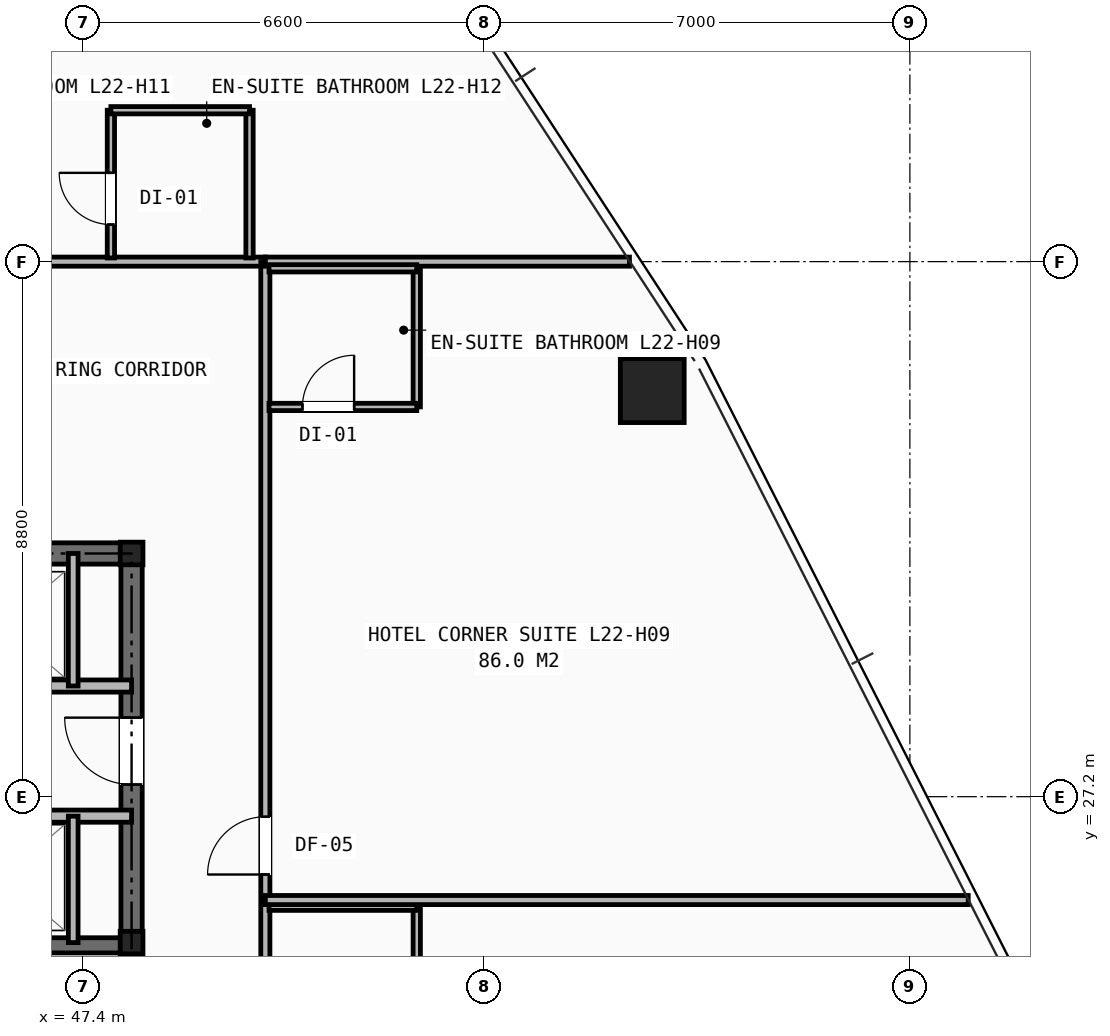
"""IFC4 building model, lengths in metres.
Left out: names, types, materials, properties, quantities, classifications, styles, units other than length and angle.
Written with IfcOpenShell. Run it as: python <this file> out.ifc"""

import sys

from ifc_helpers import new_model, si_unit, direction, frame, frame_2d, origin, origin_2d, place, context, subcontext, project, spatial, rectangle, hollow_rectangle, i_section, extrude, element, fill, save


model = new_model("IFC4")
c1 = context("Model", 3, precision=1e-05, world=origin(), true_north=direction((0.0, 1.0)))
c2 = subcontext(c1, "Body", "Model", "MODEL_VIEW")
j1 = project(units=[si_unit("LENGTHUNIT", "METRE"), si_unit("PLANEANGLEUNIT", "RADIAN")], contexts=[c1])
p1 = place(None, origin())
s1 = spatial("IfcSite", under=j1, at=p1, CompositionType="ELEMENT")
p2 = place(p1, origin())
s2 = spatial("IfcBuilding", under=s1, at=p2, CompositionType="ELEMENT")
p3 = place(p2, frame((0.0, 0.0, 79.8)))
s3 = spatial("IfcBuildingStorey", under=s2, at=p3, CompositionType="ELEMENT", Elevation=79.8)
for number, where, z_axis, x_axis in (
    (1, (48.2, 24.8, 0.0), (0.0, 0.0, 1.0), (1.0, 0.0, 0.0)),
    (2, (48.2, 31.2, 0.0), (0.0, 0.0, 1.0), (1.0, 0.0, 0.0)),
):
    element("IfcColumn", number, at=place(p3, frame(where, z_axis=z_axis, x_axis=x_axis)), inside=s3, PredefinedType="COLUMN", context=c2, shape_type="SweptSolid", body=[
        extrude(i_section(OverallWidth=0.374, OverallDepth=0.372, WebThickness=0.016, FlangeThickness=0.026, at=origin_2d()), origin(), (0.0, 0.0, 1.0), 3.2),
    ])
p4 = place(p3, frame((56.763, 33.878, 0.0), z_axis=(0.0, 0.0, 1.0), x_axis=(1.0, 0.0, 0.0)))
e3 = element("IfcColumn", 3, at=p4, inside=s3, PredefinedType="COLUMN", context=c2, shape_type="SweptSolid", body=[
    extrude(hollow_rectangle(XDim=1.05, YDim=1.05, WallThickness=0.07, at=origin_2d()), origin(), (0.0, 0.0, 1.0), 3.2),
])
p5 = place(p3, frame((31.8, 31.2, 0.0), z_axis=(0.0, 0.0, 1.0), x_axis=(1.0, 0.0, 0.0)))
e4 = element("IfcWall", 4, at=p5, inside=s3, PredefinedType="SHEAR", context=c2, shape_type="SweptSolid", body=[
    extrude(rectangle(XDim=16.4, YDim=0.35, at=frame_2d((8.2, 0.0))), origin(), (0.0, 0.0, 1.0), 2.97),
])
p6 = place(p3, frame((48.2, 16.4, 0.0), z_axis=(0.0, 0.0, 1.0), x_axis=(0.0, 1.0, 0.0)))
e5 = element("IfcWall", 5, at=p6, inside=s3, PredefinedType="SHEAR", context=c2, shape_type="SweptSolid", body=[
    extrude(rectangle(XDim=14.8, YDim=0.35, at=frame_2d((7.4, 0.0))), origin(), (0.0, 0.0, 1.0), 2.97),
])
p7 = place(p6, frame((11.0, 0.0, 0.0)))
e6 = element("IfcOpeningElement", 6, at=p7, cuts=e5, PredefinedType="OPENING", context=c2, shape_type="SweptSolid", body=[
    extrude(rectangle(XDim=1.1, YDim=2.15, at=frame_2d((0.55, 1.075))), frame((0.0, 0.185, 0.0), z_axis=(0.0, -1.0, 0.0), x_axis=(1.0, 0.0, 0.0)), (0.0, 0.0, 1.0), 0.37),
])
p8 = place(p3, frame((44.955, 24.755, 0.0), z_axis=(0.0, 0.0, 1.0), x_axis=(1.0, 0.0, 0.0)))
e7 = element("IfcWall", 7, at=p8, inside=s3, PredefinedType="SHEAR", context=c2, shape_type="SweptSolid", body=[
    extrude(rectangle(XDim=3.245, YDim=0.25, at=frame_2d((1.623, 0.0))), origin(), (0.0, 0.0, 1.0), 2.97),
])
p9 = place(p3, frame((33.82, 29.02, 0.0), z_axis=(0.0, 0.0, 1.0), x_axis=(1.0, 0.0, 0.0)))
e8 = element("IfcWall", 8, at=p9, inside=s3, PredefinedType="SOLIDWALL", context=c2, shape_type="SweptSolid", body=[
    extrude(rectangle(XDim=14.38, YDim=0.2, at=frame_2d((7.19, 0.0))), origin(), (0.0, 0.0, 1.0), 2.421),
])
p10 = place(p9, frame((0.53, 0.0, 0.0)))
e9 = element("IfcOpeningElement", 9, at=p10, cuts=e8, PredefinedType="OPENING", context=c2, shape_type="SweptSolid", body=[
    extrude(rectangle(XDim=1.1, YDim=2.15, at=frame_2d((0.55, 1.075))), frame((0.0, 0.11, 0.0), z_axis=(0.0, -1.0, 0.0), x_axis=(1.0, 0.0, 0.0)), (0.0, 0.0, 1.0), 0.22),
])
p11 = place(p9, frame((2.69, 0.0, 0.0)))
e10 = element("IfcOpeningElement", 10, at=p11, cuts=e8, PredefinedType="OPENING", context=c2, shape_type="SweptSolid", body=[
    extrude(rectangle(XDim=1.1, YDim=2.15, at=frame_2d((0.55, 1.075))), frame((0.0, 0.11, 0.0), z_axis=(0.0, -1.0, 0.0), x_axis=(1.0, 0.0, 0.0)), (0.0, 0.0, 1.0), 0.22),
])
p12 = place(p9, frame((4.85, 0.0, 0.0)))
e11 = element("IfcOpeningElement", 11, at=p12, cuts=e8, PredefinedType="OPENING", context=c2, shape_type="SweptSolid", body=[
    extrude(rectangle(XDim=1.1, YDim=2.15, at=frame_2d((0.55, 1.075))), frame((0.0, 0.11, 0.0), z_axis=(0.0, -1.0, 0.0), x_axis=(1.0, 0.0, 0.0)), (0.0, 0.0, 1.0), 0.22),
])
p13 = place(p9, frame((7.01, 0.0, 0.0)))
e12 = element("IfcOpeningElement", 12, at=p13, cuts=e8, PredefinedType="OPENING", context=c2, shape_type="SweptSolid", body=[
    extrude(rectangle(XDim=1.1, YDim=2.15, at=frame_2d((0.55, 1.075))), frame((0.0, 0.11, 0.0), z_axis=(0.0, -1.0, 0.0), x_axis=(1.0, 0.0, 0.0)), (0.0, 0.0, 1.0), 0.22),
])
p14 = place(p3, frame((31.8, 26.88, 0.0), z_axis=(0.0, 0.0, 1.0), x_axis=(1.0, 0.0, 0.0)))
e13 = element("IfcWall", 13, at=p14, inside=s3, PredefinedType="SOLIDWALL", context=c2, shape_type="SweptSolid", body=[
    extrude(rectangle(XDim=16.4, YDim=0.2, at=frame_2d((8.2, 0.0))), origin(), (0.0, 0.0, 1.0), 2.421),
])
p15 = place(p14, frame((0.55, 0.0, 0.0)))
e14 = element("IfcOpeningElement", 14, at=p15, cuts=e13, PredefinedType="OPENING", context=c2, shape_type="SweptSolid", body=[
    extrude(rectangle(XDim=0.85, YDim=2.05, at=frame_2d((0.425, 1.025))), frame((0.0, 0.11, 0.0), z_axis=(0.0, -1.0, 0.0), x_axis=(1.0, 0.0, 0.0)), (0.0, 0.0, 1.0), 0.22),
])
p16 = place(p3, frame((47.24, 29.02, 0.0), z_axis=(0.0, 0.0, 1.0), x_axis=(0.0, 1.0, 0.0)))
e15 = element("IfcWall", 15, at=p16, inside=s3, PredefinedType="SOLIDWALL", context=c2, shape_type="SweptSolid", body=[
    extrude(rectangle(XDim=2.18, YDim=0.16, at=frame_2d((1.09, 0.0))), origin(), (0.0, 0.0, 1.0), 2.421),
])
p17 = place(p3, frame((47.24, 24.8, 0.0), z_axis=(0.0, 0.0, 1.0), x_axis=(0.0, 1.0, 0.0)))
e16 = element("IfcWall", 16, at=p17, inside=s3, PredefinedType="SOLIDWALL", context=c2, shape_type="SweptSolid", body=[
    extrude(rectangle(XDim=2.08, YDim=0.16, at=frame_2d((1.04, 0.0))), origin(), (0.0, 0.0, 1.0), 2.97),
])
p18 = place(p3, frame((40.75, 36.0, 0.0), z_axis=(0.0, 0.0, 1.0), x_axis=(1.0, 0.0, 0.0)))
e17 = element("IfcWall", 17, at=p18, inside=s3, PredefinedType="PARTITIONING", context=c2, shape_type="SweptSolid", body=[
    extrude(rectangle(XDim=9.65, YDim=0.15, at=frame_2d((4.825, 0.0))), origin(), (0.0, 0.0, 1.0), 2.503),
])
p19 = place(p18, frame((3.47, 0.0, 0.0)))
e18 = element("IfcOpeningElement", 18, at=p19, cuts=e17, PredefinedType="OPENING", context=c2, shape_type="SweptSolid", body=[
    extrude(rectangle(XDim=0.95, YDim=2.1, at=frame_2d((0.475, 1.05))), frame((0.0, 0.085, 0.0), z_axis=(0.0, -1.0, 0.0), x_axis=(1.0, 0.0, 0.0)), (0.0, 0.0, 1.0), 0.17),
])
p20 = place(p3, frame((50.4, 14.1, 0.0), z_axis=(0.0, 0.0, 1.0), x_axis=(0.0, 1.0, 0.0)))
e19 = element("IfcWall", 19, at=p20, inside=s3, PredefinedType="PARTITIONING", context=c2, shape_type="SweptSolid", body=[
    extrude(rectangle(XDim=21.9, YDim=0.15, at=frame_2d((10.95, 0.0))), origin(), (0.0, 0.0, 1.0), 2.181),
])
p21 = place(p20, frame((0.42, 0.0, 0.0)))
e20 = element("IfcOpeningElement", 20, at=p21, cuts=e19, PredefinedType="OPENING", context=c2, shape_type="SweptSolid", body=[
    extrude(rectangle(XDim=0.95, YDim=2.1, at=frame_2d((0.475, 1.05))), frame((0.0, 0.085, 0.0), z_axis=(0.0, -1.0, 0.0), x_axis=(1.0, 0.0, 0.0)), (0.0, 0.0, 1.0), 0.17),
])
p22 = place(p20, frame((11.82, 0.0, 0.0)))
e21 = element("IfcOpeningElement", 21, at=p22, cuts=e19, PredefinedType="OPENING", context=c2, shape_type="SweptSolid", body=[
    extrude(rectangle(XDim=0.95, YDim=2.1, at=frame_2d((0.475, 1.05))), frame((0.0, 0.085, 0.0), z_axis=(0.0, -1.0, 0.0), x_axis=(1.0, 0.0, 0.0)), (0.0, 0.0, 1.0), 0.17),
])
p23 = place(p3, frame((50.4, 36.0, 0.0), z_axis=(0.0, 0.0, 1.0), x_axis=(1.0, 0.0, 0.0)))
e22 = element("IfcWall", 22, at=p23, inside=s3, PredefinedType="PARTITIONING", context=c2, shape_type="SweptSolid", body=[
    extrude(rectangle(XDim=5.989, YDim=0.15, at=frame_2d((2.994, 0.0))), origin(), (0.0, 0.0, 1.0), 2.258),
])
p24 = place(p3, frame((52.89, 23.11, 0.0), z_axis=(0.0, 0.0, 1.0), x_axis=(0.0, 1.0, 0.0)))
e23 = element("IfcWall", 23, at=p24, inside=s3, PredefinedType="PARTITIONING", context=c2, shape_type="SweptSolid", body=[
    extrude(rectangle(XDim=2.28, YDim=0.12, at=frame_2d((1.14, 0.0))), origin(), (0.0, 0.0, 1.0), 2.97),
])
p25 = place(p3, frame((50.46, 25.39, 0.0), z_axis=(0.0, 0.0, 1.0), x_axis=(1.0, 0.0, 0.0)))
e24 = element("IfcWall", 24, at=p25, inside=s3, PredefinedType="PARTITIONING", context=c2, shape_type="SweptSolid", body=[
    extrude(rectangle(XDim=2.43, YDim=0.12, at=frame_2d((1.215, 0.0))), origin(), (0.0, 0.0, 1.0), 2.97),
])
p26 = place(p3, frame((50.4, 25.5, 0.0), z_axis=(0.0, 0.0, 1.0), x_axis=(1.0, 0.0, 0.0)))
e25 = element("IfcWall", 25, at=p26, inside=s3, PredefinedType="PARTITIONING", context=c2, shape_type="SweptSolid", body=[
    extrude(rectangle(XDim=11.56, YDim=0.15, at=frame_2d((5.78, 0.0))), origin(), (0.0, 0.0, 1.0), 2.258),
])
p27 = place(p3, frame((52.89, 33.61, 0.0), z_axis=(0.0, 0.0, 1.0), x_axis=(0.0, 1.0, 0.0)))
e26 = element("IfcWall", 26, at=p27, inside=s3, PredefinedType="PARTITIONING", context=c2, shape_type="SweptSolid", body=[
    extrude(rectangle(XDim=2.28, YDim=0.12, at=frame_2d((1.14, 0.0))), origin(), (0.0, 0.0, 1.0), 2.97),
])
p28 = place(p3, frame((50.46, 33.61, 0.0), z_axis=(0.0, 0.0, 1.0), x_axis=(1.0, 0.0, 0.0)))
e27 = element("IfcWall", 27, at=p28, inside=s3, PredefinedType="PARTITIONING", context=c2, shape_type="SweptSolid", body=[
    extrude(rectangle(XDim=2.43, YDim=0.12, at=frame_2d((1.215, 0.0))), origin(), (0.0, 0.0, 1.0), 2.503),
])
p29 = place(p28, frame((0.55, 0.0, 0.0)))
e28 = element("IfcOpeningElement", 28, at=p29, cuts=e27, PredefinedType="OPENING", context=c2, shape_type="SweptSolid", body=[
    extrude(rectangle(XDim=0.85, YDim=2.05, at=frame_2d((0.425, 1.025))), frame((0.0, 0.07, 0.0), z_axis=(0.0, -1.0, 0.0), x_axis=(1.0, 0.0, 0.0)), (0.0, 0.0, 1.0), 0.14),
])
p30 = place(p3, frame((50.46, 35.89, 0.0), z_axis=(0.0, 0.0, 1.0), x_axis=(1.0, 0.0, 0.0)))
e29 = element("IfcWall", 29, at=p30, inside=s3, PredefinedType="PARTITIONING", context=c2, shape_type="SweptSolid", body=[
    extrude(rectangle(XDim=2.43, YDim=0.12, at=frame_2d((1.215, 0.0))), origin(), (0.0, 0.0, 1.0), 2.97),
])
p31 = place(p3, frame((47.86, 36.06, 0.0), z_axis=(0.0, 0.0, 1.0), x_axis=(0.0, 1.0, 0.0)))
e30 = element("IfcWall", 30, at=p31, inside=s3, PredefinedType="PARTITIONING", context=c2, shape_type="SweptSolid", body=[
    extrude(rectangle(XDim=2.43, YDim=0.12, at=frame_2d((1.215, 0.0))), origin(), (0.0, 0.0, 1.0), 2.503),
])
p32 = place(p31, frame((0.55, 0.0, 0.0)))
e31 = element("IfcOpeningElement", 31, at=p32, cuts=e30, PredefinedType="OPENING", context=c2, shape_type="SweptSolid", body=[
    extrude(rectangle(XDim=0.85, YDim=2.05, at=frame_2d((0.425, 1.025))), frame((0.0, 0.07, 0.0), z_axis=(0.0, -1.0, 0.0), x_axis=(1.0, 0.0, 0.0)), (0.0, 0.0, 1.0), 0.14),
])
p33 = place(p3, frame((50.14, 36.06, 0.0), z_axis=(0.0, 0.0, 1.0), x_axis=(0.0, 1.0, 0.0)))
e32 = element("IfcWall", 32, at=p33, inside=s3, PredefinedType="PARTITIONING", context=c2, shape_type="SweptSolid", body=[
    extrude(rectangle(XDim=2.43, YDim=0.12, at=frame_2d((1.215, 0.0))), origin(), (0.0, 0.0, 1.0), 2.503),
])
p34 = place(p3, frame((47.86, 38.49, 0.0), z_axis=(0.0, 0.0, 1.0), x_axis=(1.0, 0.0, 0.0)))
e33 = element("IfcWall", 33, at=p34, inside=s3, PredefinedType="PARTITIONING", context=c2, shape_type="SweptSolid", body=[
    extrude(rectangle(XDim=2.28, YDim=0.12, at=frame_2d((1.14, 0.0))), origin(), (0.0, 0.0, 1.0), 2.503),
])
p35 = place(p7, origin())
e34 = element("IfcDoor", 34, at=p35, inside=s3, OperationType="SINGLE_SWING_RIGHT", PredefinedType="DOOR", context=c2, shape_type="SweptSolid", body=[
    extrude(rectangle(XDim=1.1, YDim=2.15, at=frame_2d((0.55, 1.075))), frame((0.0, 0.025, 0.0), z_axis=(0.0, -1.0, 0.0), x_axis=(1.0, 0.0, 0.0)), (0.0, 0.0, 1.0), 0.05),
])
fill(e6, e34)
p36 = place(p22, origin())
e35 = element("IfcDoor", 35, at=p36, inside=s3, OperationType="SINGLE_SWING_LEFT", PredefinedType="DOOR", context=c2, shape_type="SweptSolid", body=[
    extrude(rectangle(XDim=0.95, YDim=2.1, at=frame_2d((0.475, 1.05))), frame((0.0, 0.025, 0.0), z_axis=(0.0, -1.0, 0.0), x_axis=(1.0, 0.0, 0.0)), (0.0, 0.0, 1.0), 0.05),
])
fill(e21, e35)
p37 = place(p29, origin())
e36 = element("IfcDoor", 36, at=p37, inside=s3, OperationType="SINGLE_SWING_RIGHT", PredefinedType="DOOR", context=c2, shape_type="SweptSolid", body=[
    extrude(rectangle(XDim=0.85, YDim=2.05, at=frame_2d((0.425, 1.025))), frame((0.0, 0.025, 0.0), z_axis=(0.0, -1.0, 0.0), x_axis=(1.0, 0.0, 0.0)), (0.0, 0.0, 1.0), 0.05),
])
fill(e28, e36)
p38 = place(p32, origin())
e37 = element("IfcDoor", 37, at=p38, inside=s3, OperationType="SINGLE_SWING_RIGHT", PredefinedType="DOOR", context=c2, shape_type="SweptSolid", body=[
    extrude(rectangle(XDim=0.85, YDim=2.05, at=frame_2d((0.425, 1.025))), frame((0.0, 0.025, 0.0), z_axis=(0.0, -1.0, 0.0), x_axis=(1.0, 0.0, 0.0)), (0.0, 0.0, 1.0), 0.05),
])
fill(e31, e37)
save(model, sys.argv[1])
